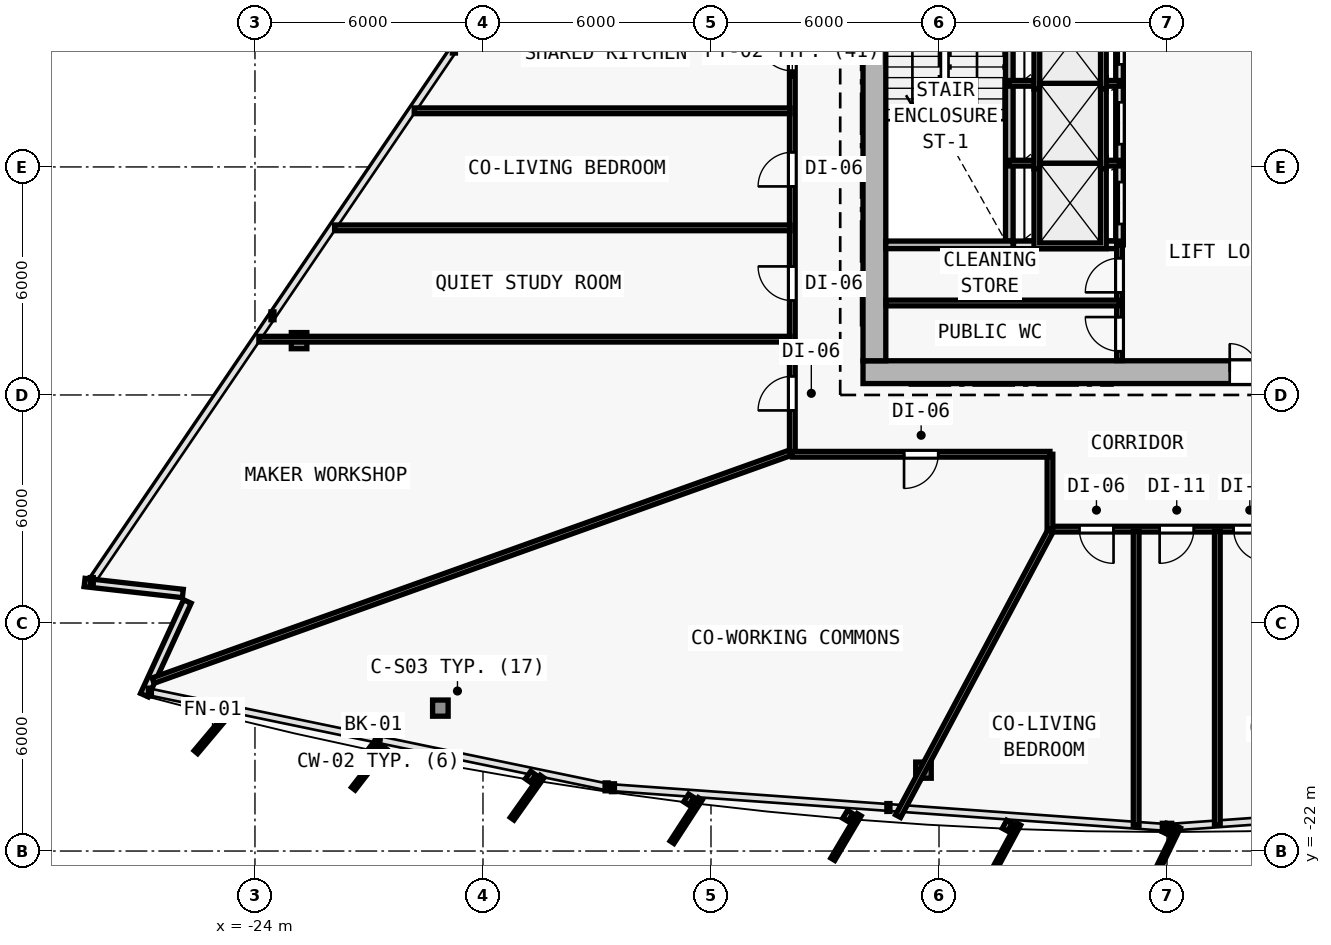
"""IFC4 building model, lengths in metres.
Left out: names, types, materials, properties, quantities, classifications, styles, units other than length and angle.
Written with IfcOpenShell. Run it as: python <this file> out.ifc"""

import sys

from ifc_helpers import new_model, si_unit, direction, frame, frame_2d, origin, origin_2d, place, context, subcontext, project, spatial, rectangle, i_section, extrude, element, fill, save


model = new_model("IFC4")
c1 = context("Model", 3, precision=1e-05, world=origin(), true_north=direction((0.0, 1.0)))
c2 = subcontext(c1, "Body", "Model", "MODEL_VIEW")
j1 = project(units=[si_unit("LENGTHUNIT", "METRE"), si_unit("PLANEANGLEUNIT", "RADIAN")], contexts=[c1])
p1 = place(None, origin())
s1 = spatial("IfcSite", under=j1, at=p1, CompositionType="ELEMENT")
p2 = place(p1, origin())
s2 = spatial("IfcBuilding", under=s1, at=p2, CompositionType="ELEMENT")
p3 = place(p2, frame((0.0, 0.0, 89.7)))
s3 = spatial("IfcBuildingStorey", under=s2, at=p3, CompositionType="ELEMENT", Elevation=89.7)
for number, where, z_axis, x_axis in (
    (1, (-7.7, -9.4, 0.0), (0.0, 0.0, 1.0), (1.0, 0.0, 0.0)),
    (2, (0.0, -9.4, 0.0), (0.0, 0.0, 1.0), (1.0, 0.0, 0.0)),
):
    element("IfcColumn", number, at=place(p3, frame(where, z_axis=z_axis, x_axis=x_axis)), inside=s3, PredefinedType="COLUMN", context=c2, shape_type="SweptSolid", body=[
        extrude(i_section(OverallWidth=0.409, OverallDepth=0.425, WebThickness=0.021, FlangeThickness=0.034, FilletRadius=0.015, at=origin_2d()), origin(), (0.0, 0.0, 1.0), 3.6),
    ])
p4 = place(p3, frame((-19.121, -18.24, 0.006), z_axis=(0.020596339702, 0.033443561496, 0.99922836178), x_axis=(-0.851480003019, 0.52438707503, 0.0)))
e3 = element("IfcColumn", 3, at=p4, inside=s3, PredefinedType="COLUMN", context=c2, shape_type="SweptSolid", body=[
    extrude(i_section(OverallWidth=0.409, OverallDepth=0.425, WebThickness=0.021, FlangeThickness=0.034, FilletRadius=0.015, at=origin_2d()), origin(), (0.0, 0.0, 1.0), 3.592),
])
p5 = place(p3, frame((-6.409, -19.872, 0.006), z_axis=(0.006934288159, 0.035283289748, 0.999353293441), x_axis=(-0.981229659911, 0.192842823335, 0.0)))
e4 = element("IfcColumn", 4, at=p5, inside=s3, PredefinedType="COLUMN", context=c2, shape_type="SweptSolid", body=[
    extrude(i_section(OverallWidth=0.409, OverallDepth=0.425, WebThickness=0.021, FlangeThickness=0.034, FilletRadius=0.015, at=origin_2d()), origin(), (0.0, 0.0, 1.0), 3.591),
])
p6 = place(p3, frame((-22.839, -8.571, 0.006), z_axis=(0.025224163578, 0.021620711639, 0.999447990843), x_axis=(-0.650791373456, 0.759256602365, 0.0)))
e5 = element("IfcColumn", 5, at=p6, inside=s3, PredefinedType="COLUMN", context=c2, shape_type="SweptSolid", body=[
    extrude(i_section(OverallWidth=0.409, OverallDepth=0.425, WebThickness=0.021, FlangeThickness=0.034, FilletRadius=0.015, at=origin_2d()), origin(), (0.0, 0.0, 1.0), 3.591),
])
p7 = place(p3, frame((-25.898, -15.223, 0.0), z_axis=(0.0, 0.0, 1.0), x_axis=(-0.993827522589, 0.110936267041, 0.0)))
e6 = element("IfcWall", 6, at=p7, inside=s3, PredefinedType="SOLIDWALL", context=c2, shape_type="SweptSolid", body=[
    extrude(rectangle(XDim=2.601, YDim=0.22, at=frame_2d((1.301, 0.0))), origin(), (0.0, 0.0, 1.0), 3.35),
])
p8 = place(p3, frame((-26.911, -17.897, 0.0), z_axis=(0.0, 0.0, 1.0), x_axis=(0.417504190978, 0.908674997189, 0.0)))
e7 = element("IfcWall", 7, at=p8, inside=s3, PredefinedType="SOLIDWALL", context=c2, shape_type="SweptSolid", body=[
    extrude(rectangle(XDim=2.711, YDim=0.22, at=frame_2d((1.355, 0.0))), origin(), (0.0, 0.0, 1.0), 3.35),
])
p9 = place(p3, frame((-8.0, -9.4, 0.0), z_axis=(0.0, 0.0, 1.0), x_axis=(1.0, 0.0, 0.0)))
e8 = element("IfcWall", 8, at=p9, inside=s3, PredefinedType="SHEAR", context=c2, shape_type="SweptSolid", body=[
    extrude(rectangle(XDim=16.0, YDim=0.6, at=frame_2d((8.0, 0.0))), origin(), (0.0, 0.0, 1.0), 3.35),
])
p10 = place(p9, frame((9.65, 0.0, 0.0)))
e9 = element("IfcOpeningElement", 9, at=p10, cuts=e8, PredefinedType="OPENING", context=c2, shape_type="SweptSolid", body=[
    extrude(rectangle(XDim=1.5, YDim=2.2, at=frame_2d((0.75, 1.1))), frame((0.0, 0.31, 0.0), z_axis=(0.0, -1.0, 0.0), x_axis=(1.0, 0.0, 0.0)), (0.0, 0.0, 1.0), 0.62),
])
p11 = place(p3, frame((-7.7, -9.1, 0.0), z_axis=(0.0, 0.0, 1.0), x_axis=(0.0, 1.0, 0.0)))
e10 = element("IfcWall", 10, at=p11, inside=s3, PredefinedType="SHEAR", context=c2, shape_type="SweptSolid", body=[
    extrude(rectangle(XDim=19.0, YDim=0.6, at=frame_2d((9.5, 0.0))), origin(), (0.0, 0.0, 1.0), 3.35),
])
p12 = place(p11, frame((12.65, 0.0, 0.0)))
e11 = element("IfcOpeningElement", 11, at=p12, cuts=e10, PredefinedType="OPENING", context=c2, shape_type="SweptSolid", body=[
    extrude(rectangle(XDim=1.1, YDim=2.15, at=frame_2d((0.55, 1.075))), frame((0.0, 0.31, 0.0), z_axis=(0.0, -1.0, 0.0), x_axis=(1.0, 0.0, 0.0)), (0.0, 0.0, 1.0), 0.62),
])
p13 = place(p3, frame((-4.15, -5.95, 0.0), z_axis=(0.0, 0.0, 1.0), x_axis=(0.0, 1.0, 0.0)))
e12 = element("IfcWall", 12, at=p13, inside=s3, PredefinedType="SOLIDWALL", context=c2, shape_type="SweptSolid", body=[
    extrude(rectangle(XDim=7.2, YDim=0.2, at=frame_2d((3.6, 0.0))), origin(), (0.0, 0.0, 1.0), 3.35),
])
p14 = place(p3, frame((-1.25, -6.05, 0.0), z_axis=(0.0, 0.0, 1.0), x_axis=(0.0, 1.0, 0.0)))
e13 = element("IfcWall", 13, at=p14, inside=s3, PredefinedType="SOLIDWALL", context=c2, shape_type="SweptSolid", body=[
    extrude(rectangle(XDim=8.7, YDim=0.2, at=frame_2d((4.35, 0.0))), origin(), (0.0, 0.0, 1.0), 3.35),
])
p15 = place(p14, frame((0.55, 0.0, 0.0)))
e14 = element("IfcOpeningElement", 14, at=p15, cuts=e13, PredefinedType="OPENING", context=c2, shape_type="SweptSolid", body=[
    extrude(rectangle(XDim=1.1, YDim=2.15, at=frame_2d((0.55, 1.075))), frame((0.0, 0.11, 0.0), z_axis=(0.0, -1.0, 0.0), x_axis=(1.0, 0.0, 0.0)), (0.0, 0.0, 1.0), 0.22),
])
p16 = place(p14, frame((2.65, 0.0, 0.0)))
e15 = element("IfcOpeningElement", 15, at=p16, cuts=e13, PredefinedType="OPENING", context=c2, shape_type="SweptSolid", body=[
    extrude(rectangle(XDim=1.1, YDim=2.15, at=frame_2d((0.55, 1.075))), frame((0.0, 0.11, 0.0), z_axis=(0.0, -1.0, 0.0), x_axis=(1.0, 0.0, 0.0)), (0.0, 0.0, 1.0), 0.22),
])
p17 = place(p14, frame((4.75, 0.0, 0.0)))
e16 = element("IfcOpeningElement", 16, at=p17, cuts=e13, PredefinedType="OPENING", context=c2, shape_type="SweptSolid", body=[
    extrude(rectangle(XDim=1.1, YDim=2.15, at=frame_2d((0.55, 1.075))), frame((0.0, 0.11, 0.0), z_axis=(0.0, -1.0, 0.0), x_axis=(1.0, 0.0, 0.0)), (0.0, 0.0, 1.0), 0.22),
])
p18 = place(p14, frame((6.85, 0.0, 0.0)))
e17 = element("IfcOpeningElement", 17, at=p18, cuts=e13, PredefinedType="OPENING", context=c2, shape_type="SweptSolid", body=[
    extrude(rectangle(XDim=1.1, YDim=2.15, at=frame_2d((0.55, 1.075))), frame((0.0, 0.11, 0.0), z_axis=(0.0, -1.0, 0.0), x_axis=(1.0, 0.0, 0.0)), (0.0, 0.0, 1.0), 0.22),
])
for number, where, z_axis, x_axis in (
    (18, (-4.15, -3.9, 0.0), (0.0, 0.0, 1.0), (1.0, 0.0, 0.0)),
    (19, (-4.15, -1.8, 0.0), (0.0, 0.0, 1.0), (1.0, 0.0, 0.0)),
):
    element("IfcWall", number, at=place(p3, frame(where, z_axis=z_axis, x_axis=x_axis)), inside=s3, PredefinedType="PARTITIONING", context=c2, shape_type="SweptSolid", body=[
        extrude(rectangle(XDim=2.9, YDim=0.15, at=frame_2d((1.45, 0.0))), origin(), (0.0, 0.0, 1.0), 3.35),
    ])
p19 = place(p3, frame((-7.4, -6.05, 0.0), z_axis=(0.0, 0.0, 1.0), x_axis=(1.0, 0.0, 0.0)))
e20 = element("IfcWall", 20, at=p19, inside=s3, PredefinedType="SOLIDWALL", context=c2, shape_type="SweptSolid", body=[
    extrude(rectangle(XDim=3.35, YDim=0.2, at=frame_2d((1.675, 0.0))), origin(), (0.0, 0.0, 1.0), 3.35),
])
p20 = place(p3, frame((-4.04, -6.05, 0.0), z_axis=(0.0, 0.0, 1.0), x_axis=(1.0, 0.0, 0.0)))
e21 = element("IfcWall", 21, at=p20, inside=s3, PredefinedType="SOLIDWALL", context=c2, shape_type="SweptSolid", body=[
    extrude(rectangle(XDim=2.79, YDim=0.2, at=frame_2d((1.395, 0.0))), origin(), (0.0, 0.0, 1.0), 3.35),
])
p21 = place(p3, frame((-1.25, -9.095, 0.0), z_axis=(0.0, 0.0, 1.0), x_axis=(0.0, 1.0, 0.0)))
e22 = element("IfcWall", 22, at=p21, inside=s3, PredefinedType="PARTITIONING", context=c2, shape_type="SweptSolid", body=[
    extrude(rectangle(XDim=3.045, YDim=0.15, at=frame_2d((1.522, 0.0))), origin(), (0.0, 0.0, 1.0), 3.35),
])
p22 = place(p21, frame((1.795, 0.0, 0.0)))
e23 = element("IfcOpeningElement", 23, at=p22, cuts=e22, PredefinedType="OPENING", context=c2, shape_type="SweptSolid", body=[
    extrude(rectangle(XDim=0.9, YDim=2.1, at=frame_2d((0.45, 1.05))), frame((0.0, 0.085, 0.0), z_axis=(0.0, -1.0, 0.0), x_axis=(1.0, 0.0, 0.0)), (0.0, 0.0, 1.0), 0.17),
])
p23 = place(p21, frame((0.245, 0.0, 0.0)))
e24 = element("IfcOpeningElement", 24, at=p23, cuts=e22, PredefinedType="OPENING", context=c2, shape_type="SweptSolid", body=[
    extrude(rectangle(XDim=0.9, YDim=2.1, at=frame_2d((0.45, 1.05))), frame((0.0, 0.085, 0.0), z_axis=(0.0, -1.0, 0.0), x_axis=(1.0, 0.0, 0.0)), (0.0, 0.0, 1.0), 0.17),
])
p24 = place(p3, frame((-7.395, -7.58, 0.0), z_axis=(0.0, 0.0, 1.0), x_axis=(1.0, 0.0, 0.0)))
e25 = element("IfcWall", 25, at=p24, inside=s3, PredefinedType="PARTITIONING", context=c2, shape_type="SweptSolid", body=[
    extrude(rectangle(XDim=6.145, YDim=0.15, at=frame_2d((3.073, 0.0))), origin(), (0.0, 0.0, 1.0), 3.35),
])
p25 = place(p3, frame((-9.86, -11.56, 0.0), z_axis=(0.0, 0.0, 1.0), x_axis=(0.0, 1.0, 0.0)))
e26 = element("IfcWall", 26, at=p25, inside=s3, PredefinedType="PARTITIONING", context=c2, shape_type="SweptSolid", body=[
    extrude(rectangle(XDim=19.986, YDim=0.15, at=frame_2d((9.993, 0.0))), origin(), (0.0, 0.0, 1.0), 2.609),
])
p26 = place(p25, frame((10.089, 0.0, 0.0)))
e27 = element("IfcOpeningElement", 27, at=p26, cuts=e26, PredefinedType="OPENING", context=c2, shape_type="SweptSolid", body=[
    extrude(rectangle(XDim=0.9, YDim=2.1, at=frame_2d((0.45, 1.05))), frame((0.0, 0.085, 0.0), z_axis=(0.0, -1.0, 0.0), x_axis=(1.0, 0.0, 0.0)), (0.0, 0.0, 1.0), 0.17),
])
p27 = place(p25, frame((7.047, 0.0, 0.0)))
e28 = element("IfcOpeningElement", 28, at=p27, cuts=e26, PredefinedType="OPENING", context=c2, shape_type="SweptSolid", body=[
    extrude(rectangle(XDim=0.9, YDim=2.1, at=frame_2d((0.45, 1.05))), frame((0.0, 0.085, 0.0), z_axis=(0.0, -1.0, 0.0), x_axis=(1.0, 0.0, 0.0)), (0.0, 0.0, 1.0), 0.17),
])
p28 = place(p25, frame((4.043, 0.0, 0.0)))
e29 = element("IfcOpeningElement", 29, at=p28, cuts=e26, PredefinedType="OPENING", context=c2, shape_type="SweptSolid", body=[
    extrude(rectangle(XDim=0.9, YDim=2.1, at=frame_2d((0.45, 1.05))), frame((0.0, 0.085, 0.0), z_axis=(0.0, -1.0, 0.0), x_axis=(1.0, 0.0, 0.0)), (0.0, 0.0, 1.0), 0.17),
])
p29 = place(p25, frame((1.153, 0.0, 0.0)))
e30 = element("IfcOpeningElement", 30, at=p29, cuts=e26, PredefinedType="OPENING", context=c2, shape_type="SweptSolid", body=[
    extrude(rectangle(XDim=0.9, YDim=2.1, at=frame_2d((0.45, 1.05))), frame((0.0, 0.085, 0.0), z_axis=(0.0, -1.0, 0.0), x_axis=(1.0, 0.0, 0.0)), (0.0, 0.0, 1.0), 0.17),
])
p30 = place(p25, frame((12.728, 0.0, 0.0)))
e31 = element("IfcOpeningElement", 31, at=p30, cuts=e26, PredefinedType="OPENING", context=c2, shape_type="SweptSolid", body=[
    extrude(rectangle(XDim=0.9, YDim=2.1, at=frame_2d((0.45, 1.05))), frame((0.0, 0.085, 0.0), z_axis=(0.0, -1.0, 0.0), x_axis=(1.0, 0.0, 0.0)), (0.0, 0.0, 1.0), 0.17),
])
p31 = place(p3, frame((3.08, -13.53, 0.0), z_axis=(0.0, 0.0, 1.0), x_axis=(-1.0, 0.0, 0.0)))
e32 = element("IfcWall", 32, at=p31, inside=s3, PredefinedType="PARTITIONING", context=c2, shape_type="SweptSolid", body=[
    extrude(rectangle(XDim=6.16, YDim=0.15, at=frame_2d((3.08, 0.0))), origin(), (0.0, 0.0, 1.0), 2.725),
])
p32 = place(p31, frame((4.487, 0.0, 0.0)))
e33 = element("IfcOpeningElement", 33, at=p32, cuts=e32, PredefinedType="OPENING", context=c2, shape_type="SweptSolid", body=[
    extrude(rectangle(XDim=0.9, YDim=2.1, at=frame_2d((0.45, 1.05))), frame((0.0, 0.085, 0.0), z_axis=(0.0, -1.0, 0.0), x_axis=(1.0, 0.0, 0.0)), (0.0, 0.0, 1.0), 0.17),
])
p33 = place(p31, frame((2.374, 0.0, 0.0)))
e34 = element("IfcOpeningElement", 34, at=p33, cuts=e32, PredefinedType="OPENING", context=c2, shape_type="SweptSolid", body=[
    extrude(rectangle(XDim=0.9, YDim=2.1, at=frame_2d((0.45, 1.05))), frame((0.0, 0.085, 0.0), z_axis=(0.0, -1.0, 0.0), x_axis=(1.0, 0.0, 0.0)), (0.0, 0.0, 1.0), 0.17),
])
p34 = place(p31, frame((0.477, 0.0, 0.0)))
e35 = element("IfcOpeningElement", 35, at=p34, cuts=e32, PredefinedType="OPENING", context=c2, shape_type="SweptSolid", body=[
    extrude(rectangle(XDim=0.85, YDim=2.1, at=frame_2d((0.425, 1.05))), frame((0.0, 0.085, 0.0), z_axis=(0.0, -1.0, 0.0), x_axis=(1.0, 0.0, 0.0)), (0.0, 0.0, 1.0), 0.17),
])
p35 = place(p3, frame((-3.08, -13.53, 0.0), z_axis=(0.0, 0.0, 1.0), x_axis=(0.0, 1.0, 0.0)))
e36 = element("IfcWall", 36, at=p35, inside=s3, PredefinedType="PARTITIONING", context=c2, shape_type="SweptSolid", body=[
    extrude(rectangle(XDim=1.97, YDim=0.15, at=frame_2d((0.985, 0.0))), origin(), (0.0, 0.0, 1.0), 3.025),
])
p36 = place(p3, frame((-3.08, -11.56, 0.0), z_axis=(0.0, 0.0, 1.0), x_axis=(-1.0, 0.0, 0.0)))
e37 = element("IfcWall", 37, at=p36, inside=s3, PredefinedType="PARTITIONING", context=c2, shape_type="SweptSolid", body=[
    extrude(rectangle(XDim=6.78, YDim=0.15, at=frame_2d((3.39, 0.0))), origin(), (0.0, 0.0, 1.0), 3.35),
])
p37 = place(p36, frame((2.94, 0.0, 0.0)))
e38 = element("IfcOpeningElement", 38, at=p37, cuts=e37, PredefinedType="OPENING", context=c2, shape_type="SweptSolid", body=[
    extrude(rectangle(XDim=0.9, YDim=2.1, at=frame_2d((0.45, 1.05))), frame((0.0, 0.085, 0.0), z_axis=(0.0, -1.0, 0.0), x_axis=(1.0, 0.0, 0.0)), (0.0, 0.0, 1.0), 0.17),
])
p38 = place(p3, frame((-3.066, -13.573, 0.0), z_axis=(0.0, 0.0, 1.0), x_axis=(-0.471121088046, -0.882068546315, 0.0)))
e39 = element("IfcWall", 39, at=p38, inside=s3, PredefinedType="PARTITIONING", context=c2, shape_type="SweptSolid", body=[
    extrude(rectangle(XDim=8.512, YDim=0.15, at=frame_2d((4.256, 0.0))), origin(), (0.0, 0.0, 1.0), 2.725),
])
p39 = place(p3, frame((-9.92, -8.532, 0.0), z_axis=(0.0, 0.0, 1.0), x_axis=(-1.0, 0.0, 0.0)))
e40 = element("IfcWall", 40, at=p39, inside=s3, PredefinedType="PARTITIONING", context=c2, shape_type="SweptSolid", body=[
    extrude(rectangle(XDim=13.977, YDim=0.15, at=frame_2d((6.988, 0.0))), origin(), (0.0, 0.0, 1.0), 2.609),
])
p40 = place(p3, frame((-9.92, -2.523, 0.0), z_axis=(0.0, 0.0, 1.0), x_axis=(-1.0, 0.0, 0.0)))
e41 = element("IfcWall", 41, at=p40, inside=s3, PredefinedType="PARTITIONING", context=c2, shape_type="SweptSolid", body=[
    extrude(rectangle(XDim=9.889, YDim=0.15, at=frame_2d((4.945, 0.0))), origin(), (0.0, 0.0, 1.0), 2.835),
])
p41 = place(p3, frame((-0.812, -13.59, 0.0), z_axis=(0.0, 0.0, 1.0), x_axis=(0.0, -1.0, 0.0)))
e42 = element("IfcWall", 42, at=p41, inside=s3, PredefinedType="PARTITIONING", context=c2, shape_type="SweptSolid", body=[
    extrude(rectangle(XDim=7.732, YDim=0.15, at=frame_2d((3.866, 0.0))), origin(), (0.0, 0.0, 1.0), 2.835),
])
p42 = place(p3, frame((-9.92, -5.603, 0.0), z_axis=(0.0, 0.0, 1.0), x_axis=(-1.0, 0.0, 0.0)))
e43 = element("IfcWall", 43, at=p42, inside=s3, PredefinedType="PARTITIONING", context=c2, shape_type="SweptSolid", body=[
    extrude(rectangle(XDim=11.984, YDim=0.15, at=frame_2d((5.992, 0.0))), origin(), (0.0, 0.0, 1.0), 2.835),
])
p43 = place(p3, frame((-9.914, -11.521, 0.0), z_axis=(0.0, 0.0, 1.0), x_axis=(-0.941614047517, -0.33669420179, 0.0)))
e44 = element("IfcWall", 44, at=p43, inside=s3, PredefinedType="PARTITIONING", context=c2, shape_type="SweptSolid", body=[
    extrude(rectangle(XDim=17.807, YDim=0.15, at=frame_2d((8.904, 0.0))), origin(), (0.0, 0.0, 1.0), 2.725),
])
p44 = place(p3, frame((1.324, -13.59, 0.0), z_axis=(0.0, 0.0, 1.0), x_axis=(0.0, -1.0, 0.0)))
e45 = element("IfcWall", 45, at=p44, inside=s3, PredefinedType="PARTITIONING", context=c2, shape_type="SweptSolid", body=[
    extrude(rectangle(XDim=7.727, YDim=0.15, at=frame_2d((3.864, 0.0))), origin(), (0.0, 0.0, 1.0), 2.835),
])
p45 = place(p10, origin())
e46 = element("IfcDoor", 46, at=p45, inside=s3, OperationType="DOUBLE_DOOR_SINGLE_SWING", PredefinedType="DOOR", context=c2, shape_type="SweptSolid", body=[
    extrude(rectangle(XDim=1.5, YDim=2.2, at=frame_2d((0.75, 1.1))), frame((0.0, 0.025, 0.0), z_axis=(0.0, -1.0, 0.0), x_axis=(1.0, 0.0, 0.0)), (0.0, 0.0, 1.0), 0.05),
])
fill(e9, e46)
p46 = place(p15, origin())
e47 = element("IfcDoor", 47, at=p46, inside=s3, OperationType="DOUBLE_DOOR_SLIDING", PredefinedType="DOOR", context=c2, shape_type="SweptSolid", body=[
    extrude(rectangle(XDim=1.1, YDim=2.15, at=frame_2d((0.55, 1.075))), frame((0.0, 0.025, 0.0), z_axis=(0.0, -1.0, 0.0), x_axis=(1.0, 0.0, 0.0)), (0.0, 0.0, 1.0), 0.05),
])
fill(e14, e47)
p47 = place(p16, origin())
e48 = element("IfcDoor", 48, at=p47, inside=s3, OperationType="DOUBLE_DOOR_SLIDING", PredefinedType="DOOR", context=c2, shape_type="SweptSolid", body=[
    extrude(rectangle(XDim=1.1, YDim=2.15, at=frame_2d((0.55, 1.075))), frame((0.0, 0.025, 0.0), z_axis=(0.0, -1.0, 0.0), x_axis=(1.0, 0.0, 0.0)), (0.0, 0.0, 1.0), 0.05),
])
fill(e15, e48)
p48 = place(p17, origin())
e49 = element("IfcDoor", 49, at=p48, inside=s3, OperationType="DOUBLE_DOOR_SLIDING", PredefinedType="DOOR", context=c2, shape_type="SweptSolid", body=[
    extrude(rectangle(XDim=1.1, YDim=2.15, at=frame_2d((0.55, 1.075))), frame((0.0, 0.025, 0.0), z_axis=(0.0, -1.0, 0.0), x_axis=(1.0, 0.0, 0.0)), (0.0, 0.0, 1.0), 0.05),
])
fill(e16, e49)
p49 = place(p22, origin())
e50 = element("IfcDoor", 50, at=p49, inside=s3, OperationType="SINGLE_SWING_LEFT", PredefinedType="DOOR", context=c2, shape_type="SweptSolid", body=[
    extrude(rectangle(XDim=0.9, YDim=2.1, at=frame_2d((0.45, 1.05))), frame((0.0, 0.025, 0.0), z_axis=(0.0, -1.0, 0.0), x_axis=(1.0, 0.0, 0.0)), (0.0, 0.0, 1.0), 0.05),
])
fill(e23, e50)
p50 = place(p23, origin())
e51 = element("IfcDoor", 51, at=p50, inside=s3, OperationType="SINGLE_SWING_RIGHT", PredefinedType="DOOR", context=c2, shape_type="SweptSolid", body=[
    extrude(rectangle(XDim=0.9, YDim=2.1, at=frame_2d((0.45, 1.05))), frame((0.0, 0.025, 0.0), z_axis=(0.0, -1.0, 0.0), x_axis=(1.0, 0.0, 0.0)), (0.0, 0.0, 1.0), 0.05),
])
fill(e24, e51)
p51 = place(p26, origin())
e52 = element("IfcDoor", 52, at=p51, inside=s3, OperationType="SINGLE_SWING_RIGHT", PredefinedType="DOOR", context=c2, shape_type="SweptSolid", body=[
    extrude(rectangle(XDim=0.9, YDim=2.1, at=frame_2d((0.45, 1.05))), frame((0.0, 0.025, 0.0), z_axis=(0.0, -1.0, 0.0), x_axis=(1.0, 0.0, 0.0)), (0.0, 0.0, 1.0), 0.05),
])
fill(e27, e52)
p52 = place(p27, origin())
e53 = element("IfcDoor", 53, at=p52, inside=s3, OperationType="SINGLE_SWING_LEFT", PredefinedType="DOOR", context=c2, shape_type="SweptSolid", body=[
    extrude(rectangle(XDim=0.9, YDim=2.1, at=frame_2d((0.45, 1.05))), frame((0.0, 0.025, 0.0), z_axis=(0.0, -1.0, 0.0), x_axis=(1.0, 0.0, 0.0)), (0.0, 0.0, 1.0), 0.05),
])
fill(e28, e53)
p53 = place(p28, origin())
e54 = element("IfcDoor", 54, at=p53, inside=s3, OperationType="SINGLE_SWING_RIGHT", PredefinedType="DOOR", context=c2, shape_type="SweptSolid", body=[
    extrude(rectangle(XDim=0.9, YDim=2.1, at=frame_2d((0.45, 1.05))), frame((0.0, 0.025, 0.0), z_axis=(0.0, -1.0, 0.0), x_axis=(1.0, 0.0, 0.0)), (0.0, 0.0, 1.0), 0.05),
])
fill(e29, e54)
p54 = place(p29, origin())
e55 = element("IfcDoor", 55, at=p54, inside=s3, OperationType="SINGLE_SWING_LEFT", PredefinedType="DOOR", context=c2, shape_type="SweptSolid", body=[
    extrude(rectangle(XDim=0.9, YDim=2.1, at=frame_2d((0.45, 1.05))), frame((0.0, 0.025, 0.0), z_axis=(0.0, -1.0, 0.0), x_axis=(1.0, 0.0, 0.0)), (0.0, 0.0, 1.0), 0.05),
])
fill(e30, e55)
p55 = place(p37, origin())
e56 = element("IfcDoor", 56, at=p55, inside=s3, OperationType="SINGLE_SWING_RIGHT", PredefinedType="DOOR", context=c2, shape_type="SweptSolid", body=[
    extrude(rectangle(XDim=0.9, YDim=2.1, at=frame_2d((0.45, 1.05))), frame((0.0, 0.025, 0.0), z_axis=(0.0, -1.0, 0.0), x_axis=(1.0, 0.0, 0.0)), (0.0, 0.0, 1.0), 0.05),
])
fill(e38, e56)
p56 = place(p32, origin())
e57 = element("IfcDoor", 57, at=p56, inside=s3, OperationType="SINGLE_SWING_LEFT", PredefinedType="DOOR", context=c2, shape_type="SweptSolid", body=[
    extrude(rectangle(XDim=0.9, YDim=2.1, at=frame_2d((0.45, 1.05))), frame((0.0, 0.025, 0.0), z_axis=(0.0, -1.0, 0.0), x_axis=(1.0, 0.0, 0.0)), (0.0, 0.0, 1.0), 0.05),
])
fill(e33, e57)
p57 = place(p33, origin())
e58 = element("IfcDoor", 58, at=p57, inside=s3, OperationType="SINGLE_SWING_RIGHT", PredefinedType="DOOR", context=c2, shape_type="SweptSolid", body=[
    extrude(rectangle(XDim=0.9, YDim=2.1, at=frame_2d((0.45, 1.05))), frame((0.0, 0.025, 0.0), z_axis=(0.0, -1.0, 0.0), x_axis=(1.0, 0.0, 0.0)), (0.0, 0.0, 1.0), 0.05),
])
fill(e34, e58)
p58 = place(p34, origin())
e59 = element("IfcDoor", 59, at=p58, inside=s3, OperationType="SINGLE_SWING_LEFT", PredefinedType="DOOR", context=c2, shape_type="SweptSolid", body=[
    extrude(rectangle(XDim=0.85, YDim=2.1, at=frame_2d((0.425, 1.05))), frame((0.0, 0.025, 0.0), z_axis=(0.0, -1.0, 0.0), x_axis=(1.0, 0.0, 0.0)), (0.0, 0.0, 1.0), 0.05),
])
fill(e35, e59)
save(model, sys.argv[1])
